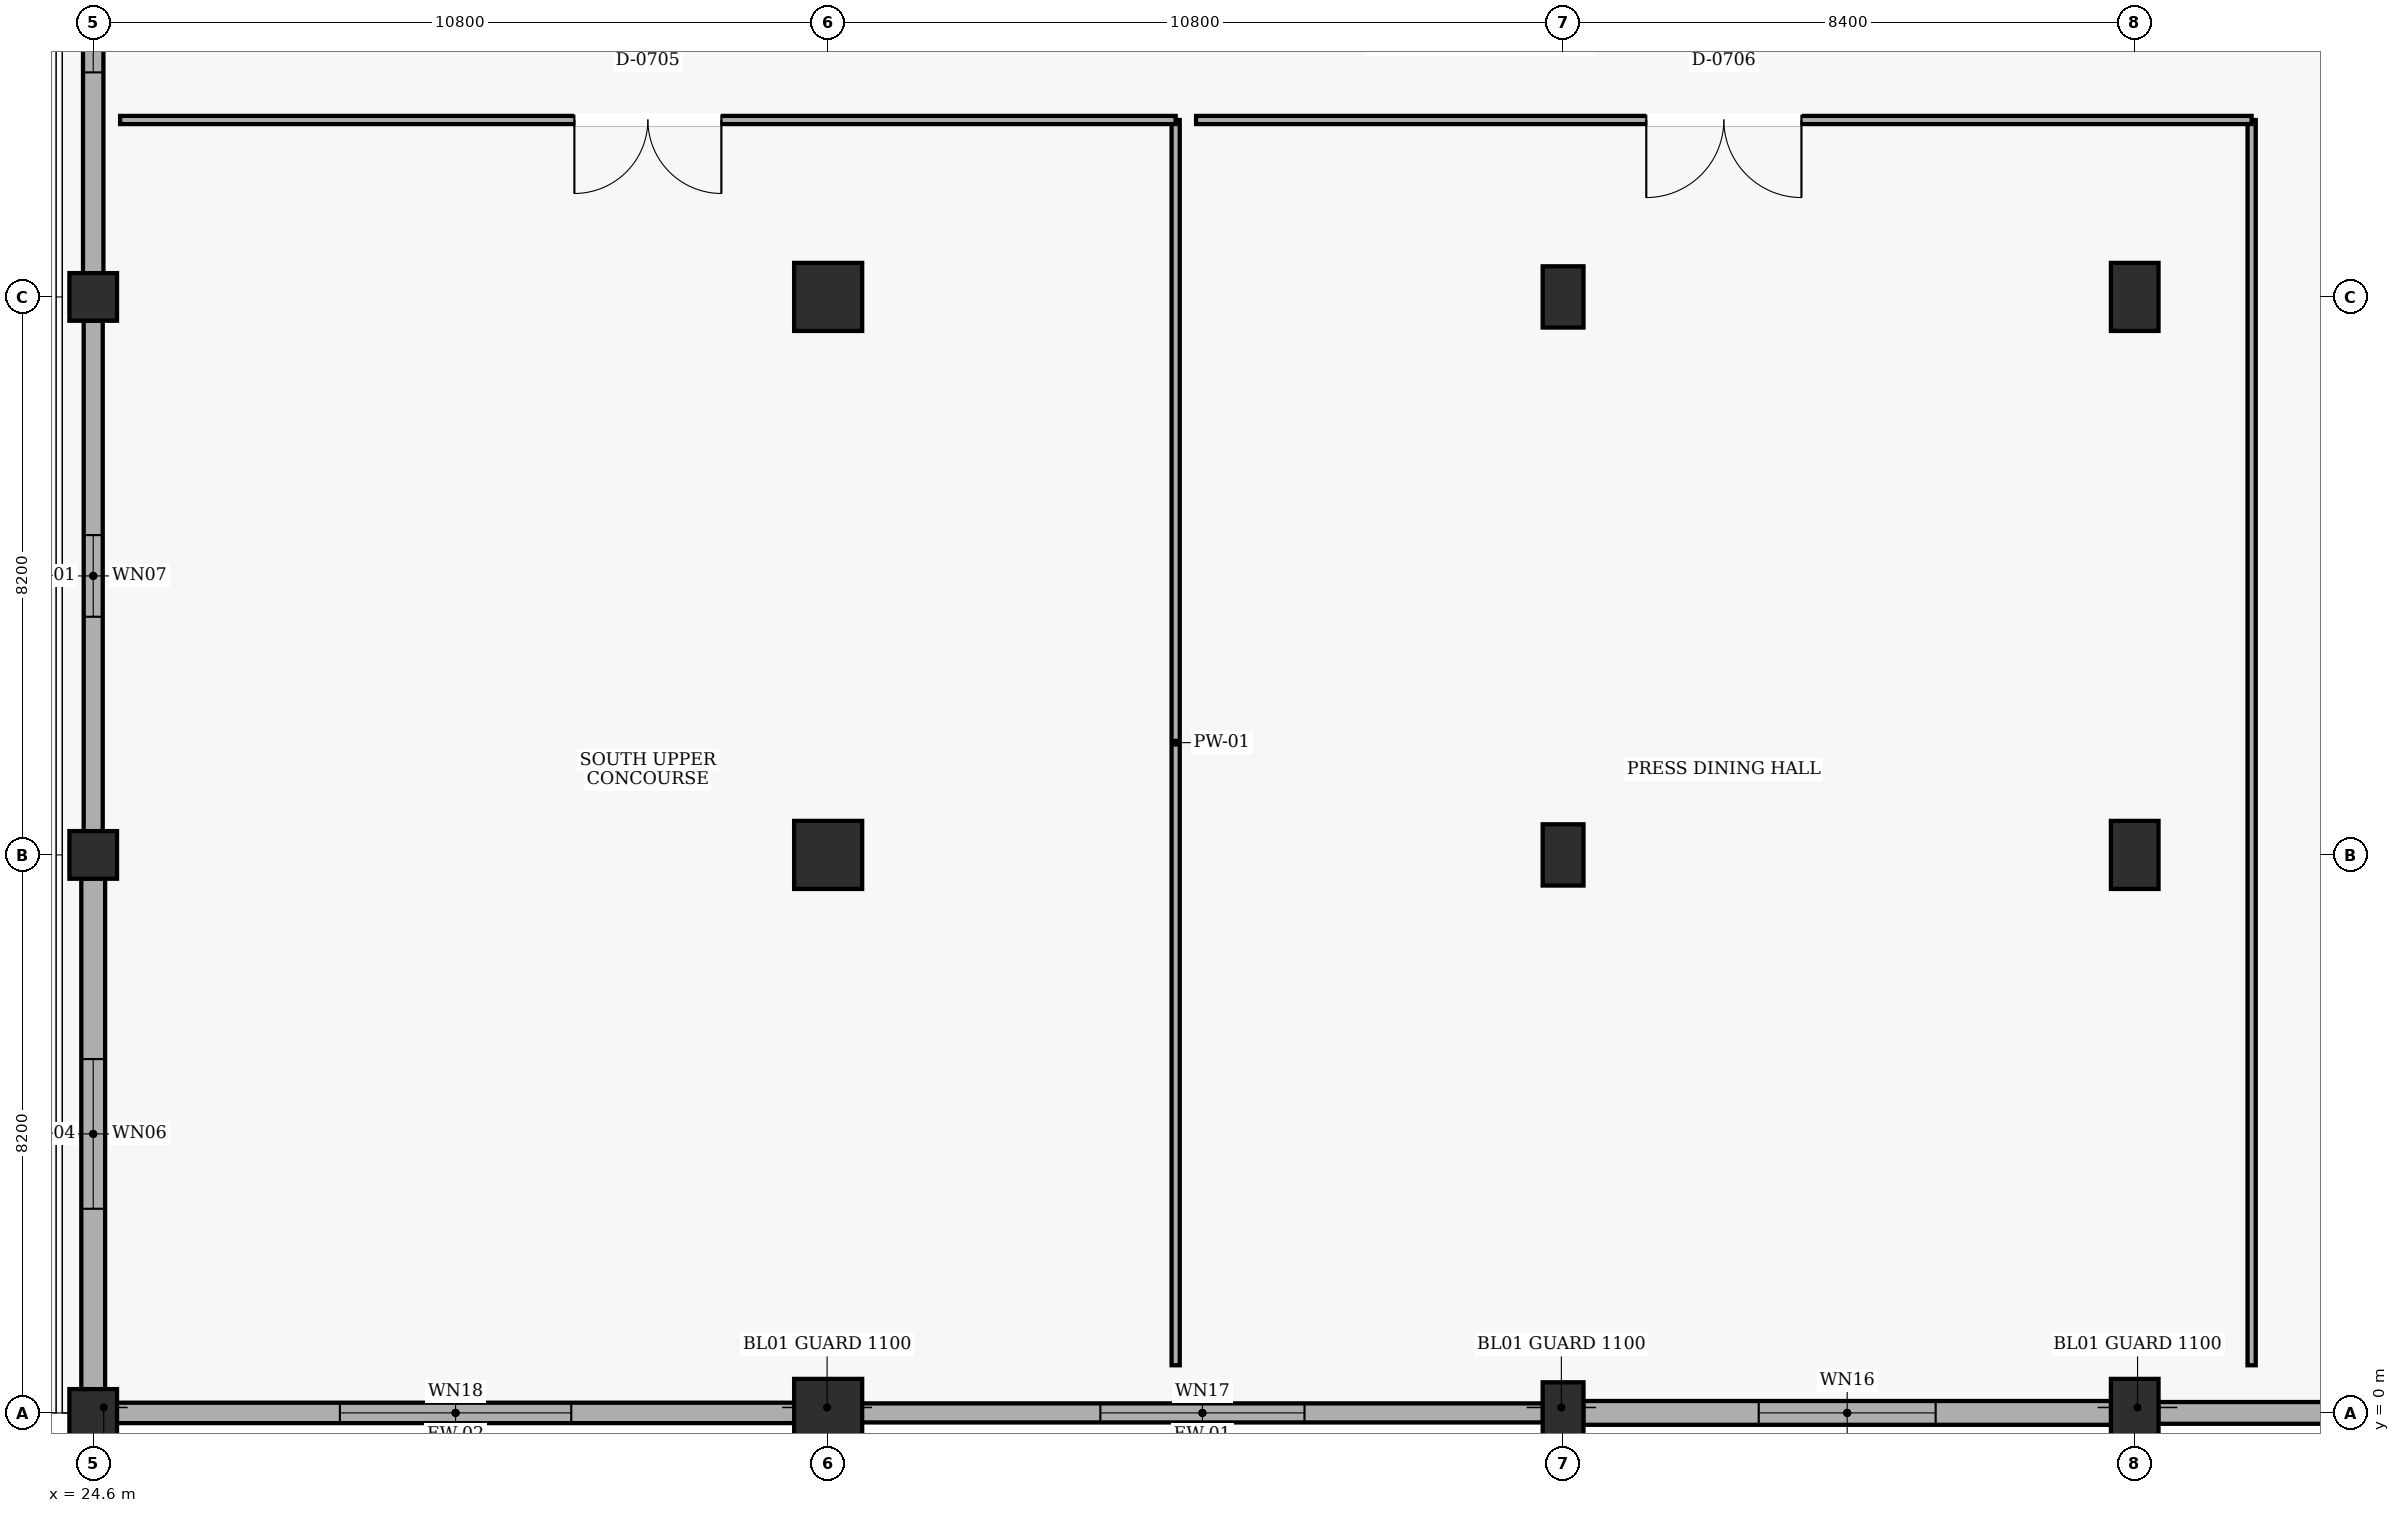
"""IFC4 building model, lengths in metres.
Left out: names, types, materials, properties, quantities, classifications, styles, units other than length and angle.
Written with IfcOpenShell. Run it as: python <this file> out.ifc"""

import sys

from ifc_helpers import new_model, si_unit, direction, frame, frame_2d, origin, origin_2d, place, context, subcontext, project, spatial, rectangle, extrude, element, fill, save


model = new_model("IFC4")
c1 = context("Model", 3, precision=1e-05, world=origin(), true_north=direction((0.0, 1.0)))
c2 = subcontext(c1, "Body", "Model", "MODEL_VIEW")
j1 = project(units=[si_unit("LENGTHUNIT", "METRE"), si_unit("PLANEANGLEUNIT", "RADIAN")], contexts=[c1])
p1 = place(None, origin())
s1 = spatial("IfcSite", under=j1, at=p1, CompositionType="ELEMENT")
p2 = place(p1, origin())
s2 = spatial("IfcBuilding", under=s1, at=p2, CompositionType="ELEMENT")
p3 = place(p2, frame((0.0, 0.0, 15.0)))
s3 = spatial("IfcBuildingStorey", under=s2, at=p3, CompositionType="ELEMENT", Elevation=15.0)
for number, where, z_axis, x_axis in (
    (1, (24.6, 0.0, 0.0), (0.0, 0.0, 1.0), (1.0, 0.0, 0.0)),
    (2, (24.6, 8.2, 0.0), (0.0, 0.0, 1.0), (1.0, 0.0, 0.0)),
    (3, (24.6, 16.4, 0.0), (0.0, 0.0, 1.0), (1.0, 0.0, 0.0)),
):
    element("IfcColumn", number, at=place(p3, frame(where, z_axis=z_axis, x_axis=x_axis)), inside=s3, PredefinedType="COLUMN", context=c2, shape_type="SweptSolid", body=[
        extrude(rectangle(XDim=0.7, YDim=0.7, at=origin_2d()), origin(), (0.0, 0.0, 1.0), 4.8),
    ])
for number, where, z_axis, x_axis in (
    (4, (35.4, 0.0, 0.0), (0.0, 0.0, 1.0), (1.0, 0.0, 0.0)),
    (5, (35.4, 8.2, 0.0), (0.0, 0.0, 1.0), (1.0, 0.0, 0.0)),
    (6, (35.4, 16.4, 0.0), (0.0, 0.0, 1.0), (1.0, 0.0, 0.0)),
):
    element("IfcColumn", number, at=place(p3, frame(where, z_axis=z_axis, x_axis=x_axis)), inside=s3, PredefinedType="COLUMN", context=c2, shape_type="SweptSolid", body=[
        extrude(rectangle(XDim=1.0, YDim=1.0, at=origin_2d()), origin(), (0.0, 0.0, 1.0), 4.8),
    ])
for number, where, z_axis, x_axis in (
    (7, (46.2, 0.0, 0.0), (0.0, 0.0, 1.0), (1.0, 0.0, 0.0)),
    (8, (46.2, 8.2, 0.0), (0.0, 0.0, 1.0), (1.0, 0.0, 0.0)),
    (9, (46.2, 16.4, 0.0), (0.0, 0.0, 1.0), (1.0, 0.0, 0.0)),
):
    element("IfcColumn", number, at=place(p3, frame(where, z_axis=z_axis, x_axis=x_axis)), inside=s3, PredefinedType="COLUMN", context=c2, shape_type="SweptSolid", body=[
        extrude(rectangle(XDim=0.6, YDim=0.9, at=origin_2d()), origin(), (0.0, 0.0, 1.0), 4.8),
    ])
for number, where, z_axis, x_axis in (
    (10, (54.6, 0.0, 0.0), (0.0, 0.0, 1.0), (1.0, 0.0, 0.0)),
    (11, (54.6, 8.2, 0.0), (0.0, 0.0, 1.0), (1.0, 0.0, 0.0)),
    (12, (54.6, 16.4, 0.0), (0.0, 0.0, 1.0), (1.0, 0.0, 0.0)),
):
    element("IfcColumn", number, at=place(p3, frame(where, z_axis=z_axis, x_axis=x_axis)), inside=s3, PredefinedType="COLUMN", context=c2, shape_type="SweptSolid", body=[
        extrude(rectangle(XDim=0.7, YDim=1.0, at=origin_2d()), origin(), (0.0, 0.0, 1.0), 4.8),
    ])
p4 = place(p3, frame((24.6, 0.345, 0.0), z_axis=(0.0, 0.0, 1.0), x_axis=(0.0, 1.0, 0.0)))
e13 = element("IfcWall", 13, at=p4, inside=s3, PredefinedType="SOLIDWALL", context=c2, shape_type="SweptSolid", body=[
    extrude(rectangle(XDim=7.51, YDim=0.35, at=frame_2d((3.755, 0.0))), origin(), (0.0, 0.0, 1.0), 3.88),
])
p5 = place(p4, frame((2.655, 0.0, 0.9)))
e14 = element("IfcOpeningElement", 14, at=p5, cuts=e13, PredefinedType="OPENING", context=c2, shape_type="SweptSolid", body=[
    extrude(rectangle(XDim=2.2, YDim=1.5, at=frame_2d((1.1, 0.75))), frame((0.0, 0.185, 0.0), z_axis=(0.0, -1.0, 0.0), x_axis=(1.0, 0.0, 0.0)), (0.0, 0.0, 1.0), 0.37),
])
p6 = place(p3, frame((24.6, 8.545, 0.0), z_axis=(0.0, 0.0, 1.0), x_axis=(0.0, 1.0, 0.0)))
e15 = element("IfcWall", 15, at=p6, inside=s3, PredefinedType="SOLIDWALL", context=c2, shape_type="SweptSolid", body=[
    extrude(rectangle(XDim=7.51, YDim=0.28, at=frame_2d((3.755, 0.0))), origin(), (0.0, 0.0, 1.0), 3.88),
])
p7 = place(p6, frame((3.155, 0.0, 0.9)))
e16 = element("IfcOpeningElement", 16, at=p7, cuts=e15, PredefinedType="OPENING", context=c2, shape_type="SweptSolid", body=[
    extrude(rectangle(XDim=1.2, YDim=1.8, at=frame_2d((0.6, 0.9))), frame((0.0, 0.15, 0.0), z_axis=(0.0, -1.0, 0.0), x_axis=(1.0, 0.0, 0.0)), (0.0, 0.0, 1.0), 0.3),
])
p8 = place(p3, frame((24.6, 16.745, 0.0), z_axis=(0.0, 0.0, 1.0), x_axis=(0.0, 1.0, 0.0)))
e17 = element("IfcWall", 17, at=p8, inside=s3, PredefinedType="SOLIDWALL", context=c2, shape_type="SweptSolid", body=[
    extrude(rectangle(XDim=7.41, YDim=0.3, at=frame_2d((3.705, 0.0))), origin(), (0.0, 0.0, 1.0), 3.88),
])
p9 = place(p8, frame((2.955, 0.0, 0.9)))
e18 = element("IfcOpeningElement", 18, at=p9, cuts=e17, PredefinedType="OPENING", context=c2, shape_type="SweptSolid", body=[
    extrude(rectangle(XDim=1.5, YDim=1.8, at=frame_2d((0.75, 0.9))), frame((0.0, 0.16, 0.0), z_axis=(0.0, -1.0, 0.0), x_axis=(1.0, 0.0, 0.0)), (0.0, 0.0, 1.0), 0.32),
])
p10 = place(p3, frame((63.105, 0.0, 0.0), z_axis=(0.0, 0.0, 1.0), x_axis=(-1.0, 0.0, 0.0)))
e19 = element("IfcWall", 19, at=p10, inside=s3, PredefinedType="SOLIDWALL", context=c2, shape_type="SweptSolid", body=[
    extrude(rectangle(XDim=8.16, YDim=0.32, at=frame_2d((4.08, 0.0))), origin(), (0.0, 0.0, 1.0), 3.78),
])
p11 = place(p10, frame((2.98, 0.0, 0.9)))
e20 = element("IfcOpeningElement", 20, at=p11, cuts=e19, PredefinedType="OPENING", context=c2, shape_type="SweptSolid", body=[
    extrude(rectangle(XDim=2.2, YDim=2.1, at=frame_2d((1.1, 1.05))), frame((0.0, 0.17, 0.0), z_axis=(0.0, -1.0, 0.0), x_axis=(1.0, 0.0, 0.0)), (0.0, 0.0, 1.0), 0.34),
])
p12 = place(p3, frame((54.255, 0.0, 0.0), z_axis=(0.0, 0.0, 1.0), x_axis=(-1.0, 0.0, 0.0)))
e21 = element("IfcWall", 21, at=p12, inside=s3, PredefinedType="SOLIDWALL", context=c2, shape_type="SweptSolid", body=[
    extrude(rectangle(XDim=7.76, YDim=0.35, at=frame_2d((3.88, 0.0))), origin(), (0.0, 0.0, 1.0), 3.78),
])
p13 = place(p12, frame((2.58, 0.0, 0.9)))
e22 = element("IfcOpeningElement", 22, at=p13, cuts=e21, PredefinedType="OPENING", context=c2, shape_type="SweptSolid", body=[
    extrude(rectangle(XDim=2.6, YDim=2.1, at=frame_2d((1.3, 1.05))), frame((0.0, 0.185, 0.0), z_axis=(0.0, -1.0, 0.0), x_axis=(1.0, 0.0, 0.0)), (0.0, 0.0, 1.0), 0.37),
])
p14 = place(p3, frame((45.905, 0.0, 0.0), z_axis=(0.0, 0.0, 1.0), x_axis=(-1.0, 0.0, 0.0)))
e23 = element("IfcWall", 23, at=p14, inside=s3, PredefinedType="SOLIDWALL", context=c2, shape_type="SweptSolid", body=[
    extrude(rectangle(XDim=10.01, YDim=0.28, at=frame_2d((5.005, 0.0))), origin(), (0.0, 0.0, 1.0), 3.68),
])
p15 = place(p14, frame((3.505, 0.0, 0.9)))
e24 = element("IfcOpeningElement", 24, at=p15, cuts=e23, PredefinedType="OPENING", context=c2, shape_type="SweptSolid", body=[
    extrude(rectangle(XDim=3.0, YDim=2.1, at=frame_2d((1.5, 1.05))), frame((0.0, 0.15, 0.0), z_axis=(0.0, -1.0, 0.0), x_axis=(1.0, 0.0, 0.0)), (0.0, 0.0, 1.0), 0.3),
])
p16 = place(p3, frame((34.905, 0.0, 0.0), z_axis=(0.0, 0.0, 1.0), x_axis=(-1.0, 0.0, 0.0)))
e25 = element("IfcWall", 25, at=p16, inside=s3, PredefinedType="SOLIDWALL", context=c2, shape_type="SweptSolid", body=[
    extrude(rectangle(XDim=9.96, YDim=0.3, at=frame_2d((4.98, 0.0))), origin(), (0.0, 0.0, 1.0), 3.68),
])
p17 = place(p16, frame((3.28, 0.0, 0.9)))
e26 = element("IfcOpeningElement", 26, at=p17, cuts=e25, PredefinedType="OPENING", context=c2, shape_type="SweptSolid", body=[
    extrude(rectangle(XDim=3.4, YDim=2.1, at=frame_2d((1.7, 1.05))), frame((0.0, 0.16, 0.0), z_axis=(0.0, -1.0, 0.0), x_axis=(1.0, 0.0, 0.0)), (0.0, 0.0, 1.0), 0.32),
])
p18 = place(p3, frame((40.507, 0.7, 0.0), z_axis=(0.0, 0.0, 1.0), x_axis=(0.0, 1.0, 0.0)))
e27 = element("IfcWall", 27, at=p18, inside=s3, PredefinedType="PARTITIONING", context=c2, shape_type="SweptSolid", body=[
    extrude(rectangle(XDim=18.3, YDim=0.12, at=frame_2d((9.15, 0.0))), origin(), (0.0, 0.0, 1.0), 4.5),
])
p19 = place(p3, frame((40.507, 19.0, 0.0), z_axis=(0.0, 0.0, 1.0), x_axis=(-1.0, 0.0, 0.0)))
e28 = element("IfcWall", 28, at=p19, inside=s3, PredefinedType="PARTITIONING", context=c2, shape_type="SweptSolid", body=[
    extrude(rectangle(XDim=15.511, YDim=0.12, at=frame_2d((7.756, 0.0))), origin(), (0.0, 0.0, 1.0), 4.5),
])
p20 = place(p19, frame((6.676, 0.0, 0.0)))
e29 = element("IfcOpeningElement", 29, at=p20, cuts=e28, PredefinedType="OPENING", context=c2, shape_type="SweptSolid", body=[
    extrude(rectangle(XDim=2.16, YDim=2.35, at=frame_2d((1.08, 1.175))), frame((0.0, 0.07, 0.0), z_axis=(0.0, -1.0, 0.0), x_axis=(1.0, 0.0, 0.0)), (0.0, 0.0, 1.0), 0.14),
])
p21 = place(p3, frame((56.318, 0.7, 0.0), z_axis=(0.0, 0.0, 1.0), x_axis=(0.0, 1.0, 0.0)))
e30 = element("IfcWall", 30, at=p21, inside=s3, PredefinedType="PARTITIONING", context=c2, shape_type="SweptSolid", body=[
    extrude(rectangle(XDim=18.3, YDim=0.12, at=frame_2d((9.15, 0.0))), origin(), (0.0, 0.0, 1.0), 4.5),
])
p22 = place(p3, frame((56.318, 19.0, 0.0), z_axis=(0.0, 0.0, 1.0), x_axis=(-1.0, 0.0, 0.0)))
e31 = element("IfcWall", 31, at=p22, inside=s3, PredefinedType="PARTITIONING", context=c2, shape_type="SweptSolid", body=[
    extrude(rectangle(XDim=15.512, YDim=0.12, at=frame_2d((7.756, 0.0))), origin(), (0.0, 0.0, 1.0), 4.5),
])
p23 = place(p22, frame((6.616, 0.0, 0.0)))
e32 = element("IfcOpeningElement", 32, at=p23, cuts=e31, PredefinedType="OPENING", context=c2, shape_type="SweptSolid", body=[
    extrude(rectangle(XDim=2.28, YDim=2.4, at=frame_2d((1.14, 1.2))), frame((0.0, 0.07, 0.0), z_axis=(0.0, -1.0, 0.0), x_axis=(1.0, 0.0, 0.0)), (0.0, 0.0, 1.0), 0.14),
])
p24 = place(p5, origin())
e33 = element("IfcWindow", 33, at=p24, inside=s3, PartitioningType="SINGLE_PANEL", PredefinedType="WINDOW", context=c2, shape_type="SweptSolid", body=[
    extrude(rectangle(XDim=2.2, YDim=1.5, at=frame_2d((1.1, 0.75))), frame((0.0, 0.03, 0.0), z_axis=(0.0, -1.0, 0.0), x_axis=(1.0, 0.0, 0.0)), (0.0, 0.0, 1.0), 0.06),
])
fill(e14, e33)
p25 = place(p7, origin())
e34 = element("IfcWindow", 34, at=p25, inside=s3, PartitioningType="SINGLE_PANEL", PredefinedType="WINDOW", context=c2, shape_type="SweptSolid", body=[
    extrude(rectangle(XDim=1.2, YDim=1.8, at=frame_2d((0.6, 0.9))), frame((0.0, 0.03, 0.0), z_axis=(0.0, -1.0, 0.0), x_axis=(1.0, 0.0, 0.0)), (0.0, 0.0, 1.0), 0.06),
])
fill(e16, e34)
p26 = place(p9, origin())
e35 = element("IfcWindow", 35, at=p26, inside=s3, PartitioningType="SINGLE_PANEL", PredefinedType="WINDOW", context=c2, shape_type="SweptSolid", body=[
    extrude(rectangle(XDim=1.5, YDim=1.8, at=frame_2d((0.75, 0.9))), frame((0.0, 0.03, 0.0), z_axis=(0.0, -1.0, 0.0), x_axis=(1.0, 0.0, 0.0)), (0.0, 0.0, 1.0), 0.06),
])
fill(e18, e35)
p27 = place(p13, origin())
e36 = element("IfcWindow", 36, at=p27, inside=s3, PartitioningType="SINGLE_PANEL", PredefinedType="WINDOW", context=c2, shape_type="SweptSolid", body=[
    extrude(rectangle(XDim=2.6, YDim=2.1, at=frame_2d((1.3, 1.05))), frame((0.0, 0.03, 0.0), z_axis=(0.0, -1.0, 0.0), x_axis=(1.0, 0.0, 0.0)), (0.0, 0.0, 1.0), 0.06),
])
fill(e22, e36)
p28 = place(p15, origin())
e37 = element("IfcWindow", 37, at=p28, inside=s3, PartitioningType="SINGLE_PANEL", PredefinedType="WINDOW", context=c2, shape_type="SweptSolid", body=[
    extrude(rectangle(XDim=3.0, YDim=2.1, at=frame_2d((1.5, 1.05))), frame((0.0, 0.03, 0.0), z_axis=(0.0, -1.0, 0.0), x_axis=(1.0, 0.0, 0.0)), (0.0, 0.0, 1.0), 0.06),
])
fill(e24, e37)
p29 = place(p17, origin())
e38 = element("IfcWindow", 38, at=p29, inside=s3, PartitioningType="SINGLE_PANEL", PredefinedType="WINDOW", context=c2, shape_type="SweptSolid", body=[
    extrude(rectangle(XDim=3.4, YDim=2.1, at=frame_2d((1.7, 1.05))), frame((0.0, 0.03, 0.0), z_axis=(0.0, -1.0, 0.0), x_axis=(1.0, 0.0, 0.0)), (0.0, 0.0, 1.0), 0.06),
])
fill(e26, e38)
p30 = place(p20, origin())
e39 = element("IfcDoor", 39, at=p30, inside=s3, OperationType="DOUBLE_DOOR_SINGLE_SWING", PredefinedType="DOOR", context=c2, shape_type="SweptSolid", body=[
    extrude(rectangle(XDim=2.16, YDim=2.35, at=frame_2d((1.08, 1.175))), frame((0.0, 0.025, 0.0), z_axis=(0.0, -1.0, 0.0), x_axis=(1.0, 0.0, 0.0)), (0.0, 0.0, 1.0), 0.05),
])
fill(e29, e39)
p31 = place(p23, origin())
e40 = element("IfcDoor", 40, at=p31, inside=s3, OperationType="DOUBLE_DOOR_SINGLE_SWING", PredefinedType="DOOR", context=c2, shape_type="SweptSolid", body=[
    extrude(rectangle(XDim=2.28, YDim=2.4, at=frame_2d((1.14, 1.2))), frame((0.0, 0.025, 0.0), z_axis=(0.0, -1.0, 0.0), x_axis=(1.0, 0.0, 0.0)), (0.0, 0.0, 1.0), 0.05),
])
fill(e32, e40)
save(model, sys.argv[1])
